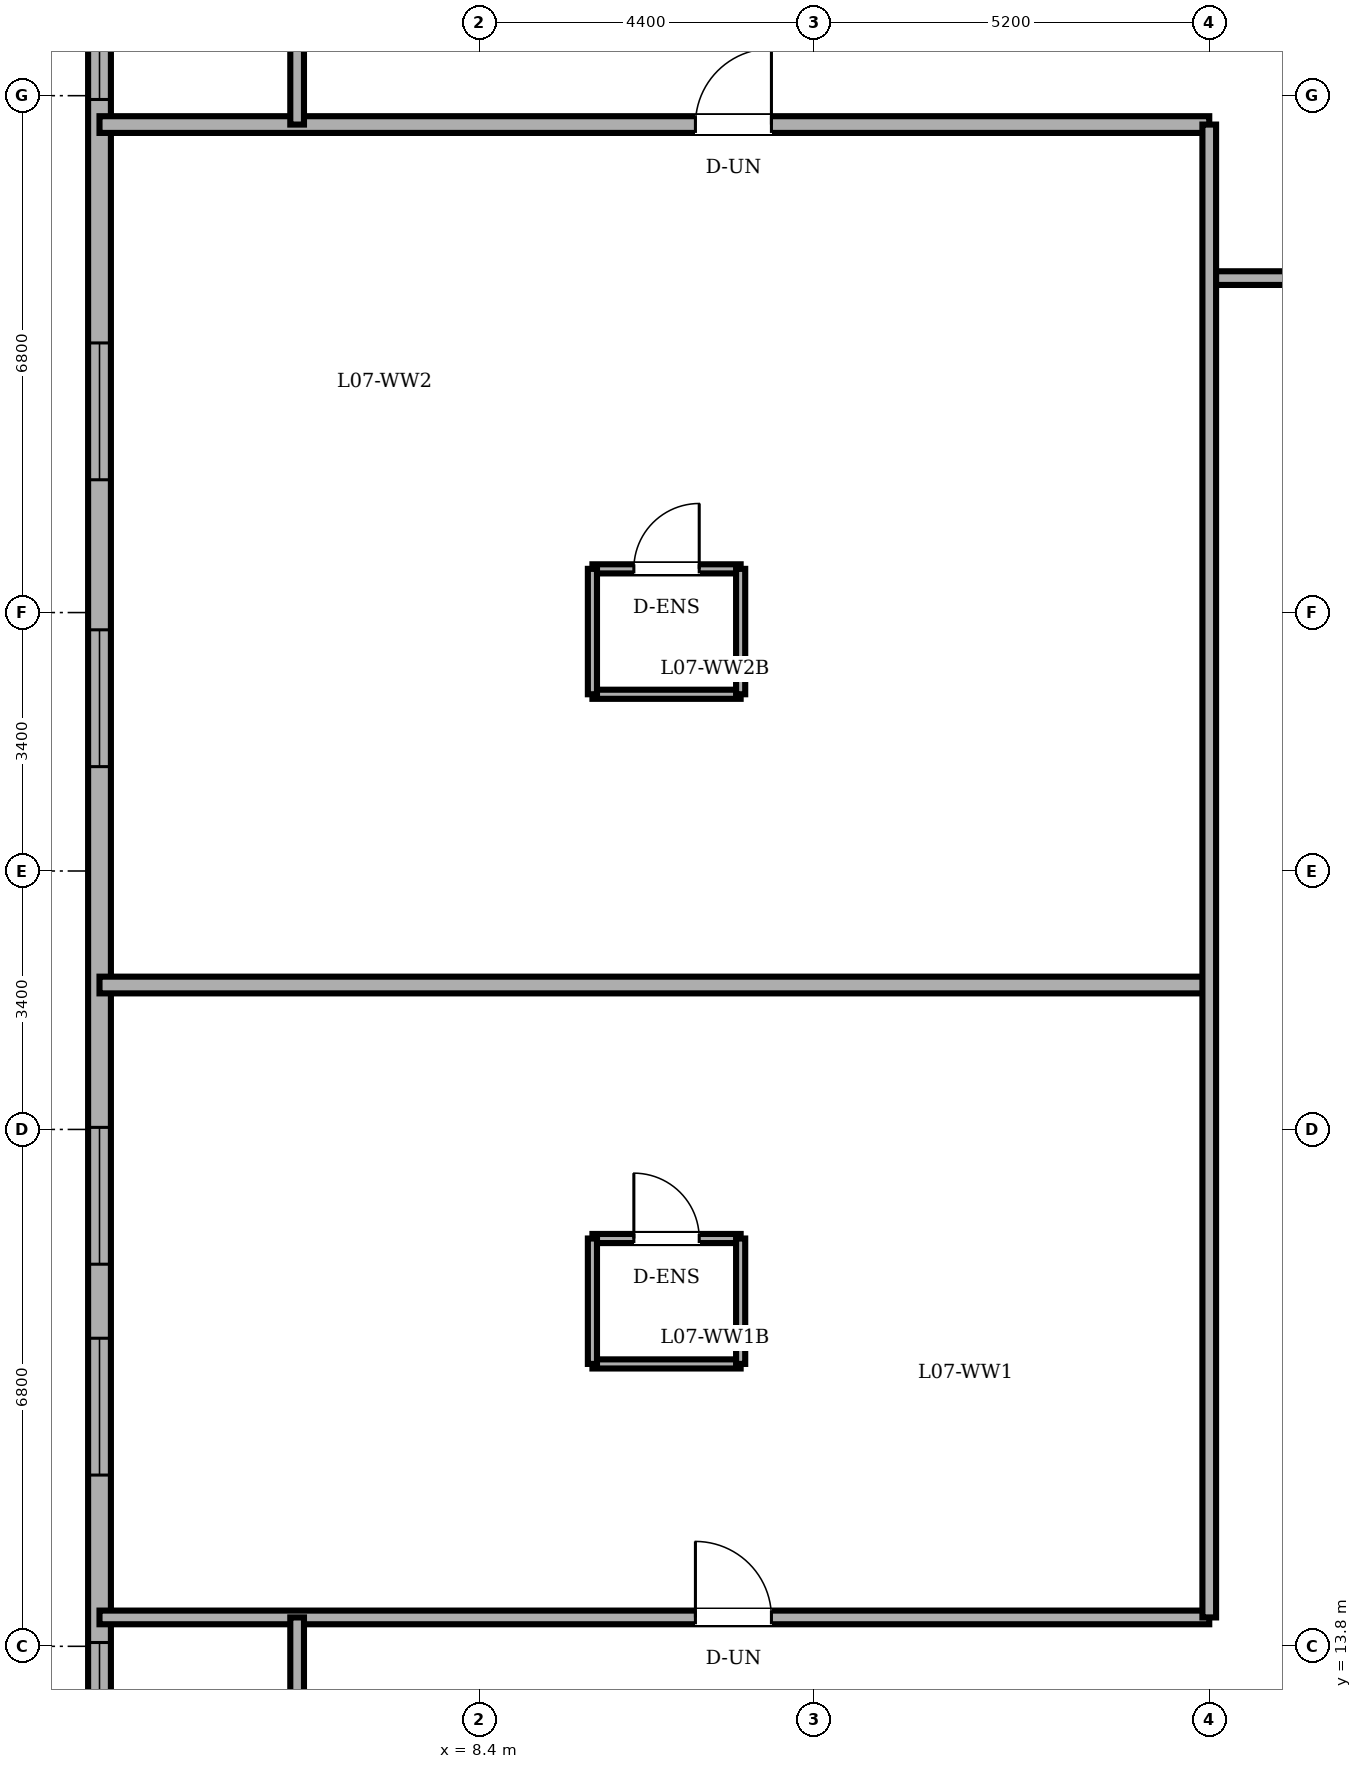
"""IFC4 building model, lengths in metres.
Left out: names, types, materials, properties, quantities, classifications, styles, units other than length and angle.
Written with IfcOpenShell. Run it as: python <this file> out.ifc"""

import sys

from ifc_helpers import new_model, si_unit, direction, frame, frame_2d, origin, place, context, subcontext, project, spatial, rectangle, extrude, element, fill, save


model = new_model("IFC4")
c1 = context("Model", 3, precision=1e-05, world=origin(), true_north=direction((0.0, 1.0)))
c2 = subcontext(c1, "Body", "Model", "MODEL_VIEW")
j1 = project(units=[si_unit("LENGTHUNIT", "METRE"), si_unit("PLANEANGLEUNIT", "RADIAN")], contexts=[c1])
p1 = place(None, origin())
s1 = spatial("IfcSite", under=j1, at=p1, CompositionType="ELEMENT")
p2 = place(p1, origin())
s2 = spatial("IfcBuilding", under=s1, at=p2, CompositionType="ELEMENT")
p3 = place(p2, frame((0.0, 0.0, 28.8)))
s3 = spatial("IfcBuildingStorey", under=s2, at=p3, CompositionType="ELEMENT", Elevation=28.8)
p4 = place(p3, frame((3.4, 40.2, 0.0), z_axis=(0.0, 0.0, 1.0), x_axis=(0.0, -1.0, 0.0)))
e1 = element("IfcWall", 1, at=p4, inside=s3, PredefinedType="SOLIDWALL", context=c2, shape_type="SweptSolid", body=[
    extrude(rectangle(XDim=32.4, YDim=0.3, at=frame_2d((16.2, 0.0))), origin(), (0.0, 0.0, 1.0), 3.4),
])
p5 = place(p4, frame((1.235, 0.0, 0.85)))
e2 = element("IfcOpeningElement", 2, at=p5, cuts=e1, PredefinedType="OPENING", context=c2, shape_type="SweptSolid", body=[
    extrude(rectangle(XDim=1.8, YDim=1.55, at=frame_2d((0.9, 0.775))), frame((0.0, 0.16, 0.0), z_axis=(0.0, -1.0, 0.0), x_axis=(1.0, 0.0, 0.0)), (0.0, 0.0, 1.0), 0.32),
])
p6 = place(p4, frame((4.25, 0.0, 0.85)))
e3 = element("IfcOpeningElement", 3, at=p6, cuts=e1, PredefinedType="OPENING", context=c2, shape_type="SweptSolid", body=[
    extrude(rectangle(XDim=1.8, YDim=1.55, at=frame_2d((0.9, 0.775))), frame((0.0, 0.16, 0.0), z_axis=(0.0, -1.0, 0.0), x_axis=(1.0, 0.0, 0.0)), (0.0, 0.0, 1.0), 0.32),
])
p7 = place(p4, frame((9.253, 0.0, 0.85)))
e4 = element("IfcOpeningElement", 4, at=p7, cuts=e1, PredefinedType="OPENING", context=c2, shape_type="SweptSolid", body=[
    extrude(rectangle(XDim=1.8, YDim=1.55, at=frame_2d((0.9, 0.775))), frame((0.0, 0.16, 0.0), z_axis=(0.0, -1.0, 0.0), x_axis=(1.0, 0.0, 0.0)), (0.0, 0.0, 1.0), 0.32),
])
p8 = place(p4, frame((13.027, 0.0, 0.85)))
e5 = element("IfcOpeningElement", 5, at=p8, cuts=e1, PredefinedType="OPENING", context=c2, shape_type="SweptSolid", body=[
    extrude(rectangle(XDim=1.8, YDim=1.55, at=frame_2d((0.9, 0.775))), frame((0.0, 0.16, 0.0), z_axis=(0.0, -1.0, 0.0), x_axis=(1.0, 0.0, 0.0)), (0.0, 0.0, 1.0), 0.32),
])
p9 = place(p4, frame((19.573, 0.0, 0.85)))
e6 = element("IfcOpeningElement", 6, at=p9, cuts=e1, PredefinedType="OPENING", context=c2, shape_type="SweptSolid", body=[
    extrude(rectangle(XDim=1.8, YDim=1.55, at=frame_2d((0.9, 0.775))), frame((0.0, 0.16, 0.0), z_axis=(0.0, -1.0, 0.0), x_axis=(1.0, 0.0, 0.0)), (0.0, 0.0, 1.0), 0.32),
])
p10 = place(p4, frame((22.347, 0.0, 0.85)))
e7 = element("IfcOpeningElement", 7, at=p10, cuts=e1, PredefinedType="OPENING", context=c2, shape_type="SweptSolid", body=[
    extrude(rectangle(XDim=1.8, YDim=1.55, at=frame_2d((0.9, 0.775))), frame((0.0, 0.16, 0.0), z_axis=(0.0, -1.0, 0.0), x_axis=(1.0, 0.0, 0.0)), (0.0, 0.0, 1.0), 0.32),
])
p11 = place(p4, frame((26.35, 0.0, 0.85)))
e8 = element("IfcOpeningElement", 8, at=p11, cuts=e1, PredefinedType="OPENING", context=c2, shape_type="SweptSolid", body=[
    extrude(rectangle(XDim=1.8, YDim=1.55, at=frame_2d((0.9, 0.775))), frame((0.0, 0.16, 0.0), z_axis=(0.0, -1.0, 0.0), x_axis=(1.0, 0.0, 0.0)), (0.0, 0.0, 1.0), 0.32),
])
p12 = place(p4, frame((29.365, 0.0, 0.85)))
e9 = element("IfcOpeningElement", 9, at=p12, cuts=e1, PredefinedType="OPENING", context=c2, shape_type="SweptSolid", body=[
    extrude(rectangle(XDim=1.8, YDim=1.55, at=frame_2d((0.9, 0.775))), frame((0.0, 0.16, 0.0), z_axis=(0.0, -1.0, 0.0), x_axis=(1.0, 0.0, 0.0)), (0.0, 0.0, 1.0), 0.32),
])
p13 = place(p3, frame((9.885, 19.165, 0.0), z_axis=(0.0, 0.0, 1.0), x_axis=(1.0, 0.0, 0.0)))
e10 = element("IfcWall", 10, at=p13, inside=s3, PredefinedType="PARTITIONING", context=c2, shape_type="SweptSolid", body=[
    extrude(rectangle(XDim=1.95, YDim=0.12, at=frame_2d((0.975, 0.0))), origin(), (0.0, 0.0, 1.0), 3.4),
])
p14 = place(p13, frame((0.545, 0.0, 0.0)))
e11 = element("IfcOpeningElement", 11, at=p14, cuts=e10, PredefinedType="OPENING", context=c2, shape_type="SweptSolid", body=[
    extrude(rectangle(XDim=0.86, YDim=2.1, at=frame_2d((0.43, 1.05))), frame((0.0, 0.07, 0.0), z_axis=(0.0, -1.0, 0.0), x_axis=(1.0, 0.0, 0.0)), (0.0, 0.0, 1.0), 0.14),
])
p15 = place(p3, frame((11.835, 17.515, 0.0), z_axis=(0.0, 0.0, 1.0), x_axis=(-1.0, 0.0, 0.0)))
e12 = element("IfcWall", 12, at=p15, inside=s3, PredefinedType="PARTITIONING", context=c2, shape_type="SweptSolid", body=[
    extrude(rectangle(XDim=1.95, YDim=0.12, at=frame_2d((0.975, 0.0))), origin(), (0.0, 0.0, 1.0), 3.4),
])
for number, where, z_axis, x_axis in (
    (13, (9.885, 19.165, 0.0), (0.0, 0.0, 1.0), (0.0, -1.0, 0.0)),
    (14, (11.835, 17.515, 0.0), (0.0, 0.0, 1.0), (0.0, 1.0, 0.0)),
):
    element("IfcWall", number, at=place(p3, frame(where, z_axis=z_axis, x_axis=x_axis)), inside=s3, PredefinedType="PARTITIONING", context=c2, shape_type="SweptSolid", body=[
        extrude(rectangle(XDim=1.65, YDim=0.12, at=frame_2d((0.825, 0.0))), origin(), (0.0, 0.0, 1.0), 3.4),
    ])
p16 = place(p3, frame((9.885, 27.975, 0.0), z_axis=(0.0, 0.0, 1.0), x_axis=(1.0, 0.0, 0.0)))
e15 = element("IfcWall", 15, at=p16, inside=s3, PredefinedType="PARTITIONING", context=c2, shape_type="SweptSolid", body=[
    extrude(rectangle(XDim=1.95, YDim=0.12, at=frame_2d((0.975, 0.0))), origin(), (0.0, 0.0, 1.0), 3.4),
])
p17 = place(p16, frame((0.545, 0.0, 0.0)))
e16 = element("IfcOpeningElement", 16, at=p17, cuts=e15, PredefinedType="OPENING", context=c2, shape_type="SweptSolid", body=[
    extrude(rectangle(XDim=0.86, YDim=2.1, at=frame_2d((0.43, 1.05))), frame((0.0, 0.07, 0.0), z_axis=(0.0, -1.0, 0.0), x_axis=(1.0, 0.0, 0.0)), (0.0, 0.0, 1.0), 0.14),
])
p18 = place(p3, frame((11.835, 26.325, 0.0), z_axis=(0.0, 0.0, 1.0), x_axis=(-1.0, 0.0, 0.0)))
e17 = element("IfcWall", 17, at=p18, inside=s3, PredefinedType="PARTITIONING", context=c2, shape_type="SweptSolid", body=[
    extrude(rectangle(XDim=1.95, YDim=0.12, at=frame_2d((0.975, 0.0))), origin(), (0.0, 0.0, 1.0), 3.4),
])
for number, where, z_axis, x_axis in (
    (18, (9.885, 27.975, 0.0), (0.0, 0.0, 1.0), (0.0, -1.0, 0.0)),
    (19, (11.835, 26.325, 0.0), (0.0, 0.0, 1.0), (0.0, 1.0, 0.0)),
):
    element("IfcWall", number, at=place(p3, frame(where, z_axis=z_axis, x_axis=x_axis)), inside=s3, PredefinedType="PARTITIONING", context=c2, shape_type="SweptSolid", body=[
        extrude(rectangle(XDim=1.65, YDim=0.12, at=frame_2d((0.825, 0.0))), origin(), (0.0, 0.0, 1.0), 3.4),
    ])
p19 = place(p3, frame((3.4, 14.18, 0.0), z_axis=(0.0, 0.0, 1.0), x_axis=(1.0, 0.0, 0.0)))
e20 = element("IfcWall", 20, at=p19, inside=s3, PredefinedType="PARTITIONING", context=c2, shape_type="SweptSolid", body=[
    extrude(rectangle(XDim=14.6, YDim=0.18, at=frame_2d((7.3, 0.0))), origin(), (0.0, 0.0, 1.0), 3.4),
])
p20 = place(p19, frame((7.84, 0.0, 0.0)))
e21 = element("IfcOpeningElement", 21, at=p20, cuts=e20, PredefinedType="OPENING", context=c2, shape_type="SweptSolid", body=[
    extrude(rectangle(XDim=1.0, YDim=2.15, at=frame_2d((0.5, 1.075))), frame((0.0, 0.1, 0.0), z_axis=(0.0, -1.0, 0.0), x_axis=(1.0, 0.0, 0.0)), (0.0, 0.0, 1.0), 0.2),
])
p21 = place(p3, frame((3.4, 22.5, 0.0), z_axis=(0.0, 0.0, 1.0), x_axis=(1.0, 0.0, 0.0)))
e22 = element("IfcWall", 22, at=p21, inside=s3, PredefinedType="PARTITIONING", context=c2, shape_type="SweptSolid", body=[
    extrude(rectangle(XDim=14.6, YDim=0.22, at=frame_2d((7.3, 0.0))), origin(), (0.0, 0.0, 1.0), 3.4),
])
p22 = place(p3, frame((18.0, 31.8, 0.0), z_axis=(0.0, 0.0, 1.0), x_axis=(1.0, 0.0, 0.0)))
e23 = element("IfcWall", 23, at=p22, inside=s3, PredefinedType="PARTITIONING", context=c2, shape_type="SweptSolid", body=[
    extrude(rectangle(XDim=2.35, YDim=0.18, at=frame_2d((1.175, 0.0))), origin(), (0.0, 0.0, 1.0), 3.4),
])
p23 = place(p3, frame((3.4, 33.82, 0.0), z_axis=(0.0, 0.0, 1.0), x_axis=(1.0, 0.0, 0.0)))
e24 = element("IfcWall", 24, at=p23, inside=s3, PredefinedType="PARTITIONING", context=c2, shape_type="SweptSolid", body=[
    extrude(rectangle(XDim=14.6, YDim=0.22, at=frame_2d((7.3, 0.0))), origin(), (0.0, 0.0, 1.0), 3.4),
])
p24 = place(p23, frame((7.84, 0.0, 0.0)))
e25 = element("IfcOpeningElement", 25, at=p24, cuts=e24, PredefinedType="OPENING", context=c2, shape_type="SweptSolid", body=[
    extrude(rectangle(XDim=1.0, YDim=2.15, at=frame_2d((0.5, 1.075))), frame((0.0, 0.12, 0.0), z_axis=(0.0, -1.0, 0.0), x_axis=(1.0, 0.0, 0.0)), (0.0, 0.0, 1.0), 0.24),
])
for number, where, z_axis, x_axis in (
    (26, (6.0, 11.72, 0.0), (0.0, 0.0, 1.0), (0.0, 1.0, 0.0)),
    (27, (6.0, 33.82, 0.0), (0.0, 0.0, 1.0), (0.0, 1.0, 0.0)),
):
    element("IfcWall", number, at=place(p3, frame(where, z_axis=z_axis, x_axis=x_axis)), inside=s3, PredefinedType="PARTITIONING", context=c2, shape_type="SweptSolid", body=[
        extrude(rectangle(XDim=2.46, YDim=0.18, at=frame_2d((1.23, 0.0))), origin(), (0.0, 0.0, 1.0), 3.4),
    ])
p25 = place(p3, frame((18.0, 14.18, 0.0), z_axis=(0.0, 0.0, 1.0), x_axis=(0.0, 1.0, 0.0)))
e28 = element("IfcWall", 28, at=p25, inside=s3, PredefinedType="PARTITIONING", context=c2, shape_type="SweptSolid", body=[
    extrude(rectangle(XDim=19.64, YDim=0.18, at=frame_2d((9.82, 0.0))), origin(), (0.0, 0.0, 1.0), 3.4),
])
p26 = place(p6, origin())
e29 = element("IfcWindow", 29, at=p26, inside=s3, PartitioningType="DOUBLE_PANEL_VERTICAL", PredefinedType="WINDOW", context=c2, shape_type="SweptSolid", body=[
    extrude(rectangle(XDim=1.8, YDim=1.55, at=frame_2d((0.9, 0.775))), frame((0.0, 0.03, 0.0), z_axis=(0.0, -1.0, 0.0), x_axis=(1.0, 0.0, 0.0)), (0.0, 0.0, 1.0), 0.06),
])
fill(e3, e29)
p27 = place(p7, origin())
e30 = element("IfcWindow", 30, at=p27, inside=s3, PartitioningType="DOUBLE_PANEL_VERTICAL", PredefinedType="WINDOW", context=c2, shape_type="SweptSolid", body=[
    extrude(rectangle(XDim=1.8, YDim=1.55, at=frame_2d((0.9, 0.775))), frame((0.0, 0.03, 0.0), z_axis=(0.0, -1.0, 0.0), x_axis=(1.0, 0.0, 0.0)), (0.0, 0.0, 1.0), 0.06),
])
fill(e4, e30)
p28 = place(p8, origin())
e31 = element("IfcWindow", 31, at=p28, inside=s3, PartitioningType="DOUBLE_PANEL_VERTICAL", PredefinedType="WINDOW", context=c2, shape_type="SweptSolid", body=[
    extrude(rectangle(XDim=1.8, YDim=1.55, at=frame_2d((0.9, 0.775))), frame((0.0, 0.03, 0.0), z_axis=(0.0, -1.0, 0.0), x_axis=(1.0, 0.0, 0.0)), (0.0, 0.0, 1.0), 0.06),
])
fill(e5, e31)
p29 = place(p9, origin())
e32 = element("IfcWindow", 32, at=p29, inside=s3, PartitioningType="DOUBLE_PANEL_VERTICAL", PredefinedType="WINDOW", context=c2, shape_type="SweptSolid", body=[
    extrude(rectangle(XDim=1.8, YDim=1.55, at=frame_2d((0.9, 0.775))), frame((0.0, 0.03, 0.0), z_axis=(0.0, -1.0, 0.0), x_axis=(1.0, 0.0, 0.0)), (0.0, 0.0, 1.0), 0.06),
])
fill(e6, e32)
p30 = place(p10, origin())
e33 = element("IfcWindow", 33, at=p30, inside=s3, PartitioningType="DOUBLE_PANEL_VERTICAL", PredefinedType="WINDOW", context=c2, shape_type="SweptSolid", body=[
    extrude(rectangle(XDim=1.8, YDim=1.55, at=frame_2d((0.9, 0.775))), frame((0.0, 0.03, 0.0), z_axis=(0.0, -1.0, 0.0), x_axis=(1.0, 0.0, 0.0)), (0.0, 0.0, 1.0), 0.06),
])
fill(e7, e33)
p31 = place(p11, origin())
e34 = element("IfcWindow", 34, at=p31, inside=s3, PartitioningType="DOUBLE_PANEL_VERTICAL", PredefinedType="WINDOW", context=c2, shape_type="SweptSolid", body=[
    extrude(rectangle(XDim=1.8, YDim=1.55, at=frame_2d((0.9, 0.775))), frame((0.0, 0.03, 0.0), z_axis=(0.0, -1.0, 0.0), x_axis=(1.0, 0.0, 0.0)), (0.0, 0.0, 1.0), 0.06),
])
fill(e8, e34)
p32 = place(p14, origin())
e35 = element("IfcDoor", 35, at=p32, inside=s3, OperationType="SINGLE_SWING_LEFT", PredefinedType="DOOR", context=c2, shape_type="SweptSolid", body=[
    extrude(rectangle(XDim=0.86, YDim=2.1, at=frame_2d((0.43, 1.05))), frame((0.0, 0.025, 0.0), z_axis=(0.0, -1.0, 0.0), x_axis=(1.0, 0.0, 0.0)), (0.0, 0.0, 1.0), 0.05),
])
fill(e11, e35)
p33 = place(p17, origin())
e36 = element("IfcDoor", 36, at=p33, inside=s3, OperationType="SINGLE_SWING_RIGHT", PredefinedType="DOOR", context=c2, shape_type="SweptSolid", body=[
    extrude(rectangle(XDim=0.86, YDim=2.1, at=frame_2d((0.43, 1.05))), frame((0.0, 0.025, 0.0), z_axis=(0.0, -1.0, 0.0), x_axis=(1.0, 0.0, 0.0)), (0.0, 0.0, 1.0), 0.05),
])
fill(e16, e36)
p34 = place(p20, origin())
e37 = element("IfcDoor", 37, at=p34, inside=s3, OperationType="SINGLE_SWING_LEFT", PredefinedType="DOOR", context=c2, shape_type="SweptSolid", body=[
    extrude(rectangle(XDim=1.0, YDim=2.15, at=frame_2d((0.5, 1.075))), frame((0.0, 0.025, 0.0), z_axis=(0.0, -1.0, 0.0), x_axis=(1.0, 0.0, 0.0)), (0.0, 0.0, 1.0), 0.05),
])
fill(e21, e37)
p35 = place(p24, origin())
e38 = element("IfcDoor", 38, at=p35, inside=s3, OperationType="SINGLE_SWING_RIGHT", PredefinedType="DOOR", context=c2, shape_type="SweptSolid", body=[
    extrude(rectangle(XDim=1.0, YDim=2.15, at=frame_2d((0.5, 1.075))), frame((0.0, 0.025, 0.0), z_axis=(0.0, -1.0, 0.0), x_axis=(1.0, 0.0, 0.0)), (0.0, 0.0, 1.0), 0.05),
])
fill(e25, e38)
save(model, sys.argv[1])
